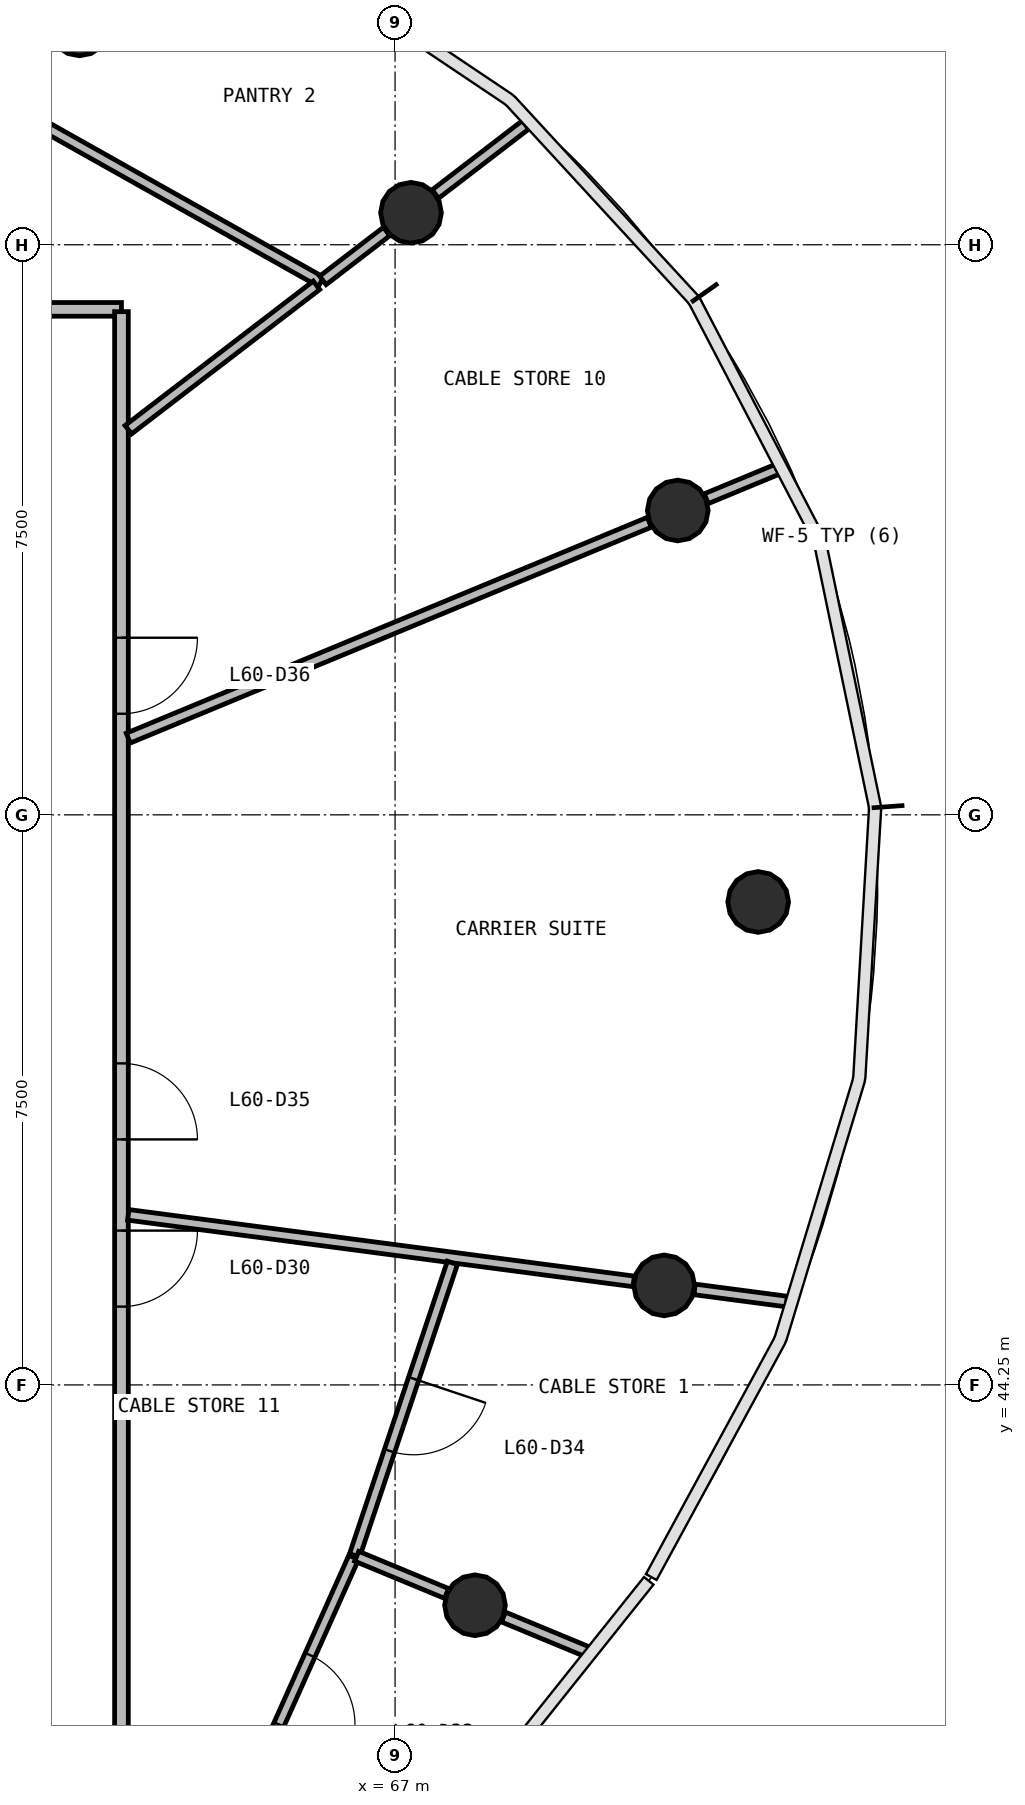
"""IFC4 building model, lengths in metres.
Left out: names, types, materials, properties, quantities, classifications, styles, units other than length and angle.
Written with IfcOpenShell. Run it as: python <this file> out.ifc"""

import sys

from ifc_helpers import new_model, si_unit, direction, frame, frame_2d, origin, origin_2d, place, context, subcontext, project, spatial, rectangle, circle, extrude, source, transform, mapped, element, fill, save


model = new_model("IFC4")
c1 = context("Model", 3, precision=1e-05, world=origin(), true_north=direction((0.0, 1.0)))
c2 = subcontext(c1, "Body", "Model", "MODEL_VIEW")
j1 = project(units=[si_unit("LENGTHUNIT", "METRE"), si_unit("PLANEANGLEUNIT", "RADIAN")], contexts=[c1])
p1 = place(None, origin())
s1 = spatial("IfcSite", under=j1, at=p1, CompositionType="ELEMENT")
p2 = place(p1, origin())
s2 = spatial("IfcBuilding", under=s1, at=p2, CompositionType="ELEMENT")
p3 = place(p2, frame((0.0, 0.0, 246.2)))
s3 = spatial("IfcBuildingStorey", under=s2, at=p3, CompositionType="ELEMENT", Elevation=246.2)
m1 = source(origin(), c2, "Body", "SweptSolid", [
    extrude(circle(Radius=0.4, at=origin_2d()), origin(), (0.0, 0.0, 1.0), 3.9),
])
for number, where, z_axis, x_axis in (
    (1, (71.777, 50.604, 0.0), (0.0, 0.0, 1.0), (1.0, 0.0, 0.0)),
    (2, (70.719, 55.754, 0.0), (0.0, 0.0, 1.0), (1.0, 0.0, 0.0)),
    (3, (67.209, 59.671, 0.0), (0.0, 0.0, 1.0), (1.0, 0.0, 0.0)),
    (4, (62.847, 62.136, 0.0), (0.0, 0.0, 1.0), (1.0, 0.0, 0.0)),
    (5, (68.052, 41.351, 0.0), (0.0, 0.0, 1.0), (1.0, 0.0, 0.0)),
    (6, (70.54, 45.559, 0.0), (0.0, 0.0, 1.0), (1.0, 0.0, 0.0)),
):
    element("IfcColumn", number, at=place(p3, frame(where, z_axis=z_axis, x_axis=x_axis)), inside=s3, PredefinedType="COLUMN", context=c2, shape_type="MappedRepresentation", body=[
        mapped(m1, transform((0.0, 0.0, 0.0), scale=1.0)),
    ])
p4 = place(p3, frame((40.6, 58.4, 0.0), z_axis=(0.0, 0.0, 1.0), x_axis=(1.0, 0.0, 0.0)))
e7 = element("IfcWall", 7, at=p4, inside=s3, PredefinedType="PARTITIONING", context=c2, shape_type="SweptSolid", body=[
    extrude(rectangle(XDim=22.8, YDim=0.18, at=frame_2d((11.4, 0.0))), origin(), (0.0, 0.0, 1.0), 2.88),
])
p5 = place(p4, frame((10.85, 0.0, 0.0)))
e8 = element("IfcOpeningElement", 8, at=p5, cuts=e7, PredefinedType="OPENING", context=c2, shape_type="SweptSolid", body=[
    extrude(rectangle(XDim=0.9, YDim=2.1, at=frame_2d((0.45, 1.05))), frame((0.0, 0.1, 0.0), z_axis=(0.0, -1.0, 0.0), x_axis=(1.0, 0.0, 0.0)), (0.0, 0.0, 1.0), 0.2),
])
p6 = place(p4, frame((8.85, 0.0, 0.0)))
e9 = element("IfcOpeningElement", 9, at=p6, cuts=e7, PredefinedType="OPENING", context=c2, shape_type="SweptSolid", body=[
    extrude(rectangle(XDim=0.9, YDim=2.1, at=frame_2d((0.45, 1.05))), frame((0.0, 0.1, 0.0), z_axis=(0.0, -1.0, 0.0), x_axis=(1.0, 0.0, 0.0)), (0.0, 0.0, 1.0), 0.2),
])
p7 = place(p4, frame((5.75, 0.0, 0.0)))
e10 = element("IfcOpeningElement", 10, at=p7, cuts=e7, PredefinedType="OPENING", context=c2, shape_type="SweptSolid", body=[
    extrude(rectangle(XDim=1.0, YDim=2.1, at=frame_2d((0.5, 1.05))), frame((0.0, 0.1, 0.0), z_axis=(0.0, -1.0, 0.0), x_axis=(1.0, 0.0, 0.0)), (0.0, 0.0, 1.0), 0.2),
])
p8 = place(p4, frame((16.15, 0.0, 0.0)))
e11 = element("IfcOpeningElement", 11, at=p8, cuts=e7, PredefinedType="OPENING", context=c2, shape_type="SweptSolid", body=[
    extrude(rectangle(XDim=1.0, YDim=2.1, at=frame_2d((0.5, 1.05))), frame((0.0, 0.1, 0.0), z_axis=(0.0, -1.0, 0.0), x_axis=(1.0, 0.0, 0.0)), (0.0, 0.0, 1.0), 0.2),
])
p9 = place(p4, frame((12.95, 0.0, 0.0)))
e12 = element("IfcOpeningElement", 12, at=p9, cuts=e7, PredefinedType="OPENING", context=c2, shape_type="SweptSolid", body=[
    extrude(rectangle(XDim=1.0, YDim=2.1, at=frame_2d((0.5, 1.05))), frame((0.0, 0.1, 0.0), z_axis=(0.0, -1.0, 0.0), x_axis=(1.0, 0.0, 0.0)), (0.0, 0.0, 1.0), 0.2),
])
p10 = place(p3, frame((63.4, 58.37, 0.0), z_axis=(0.0, 0.0, 1.0), x_axis=(0.0, -1.0, 0.0)))
e13 = element("IfcWall", 13, at=p10, inside=s3, PredefinedType="PARTITIONING", context=c2, shape_type="SweptSolid", body=[
    extrude(rectangle(XDim=20.74, YDim=0.18, at=frame_2d((10.37, 0.0))), origin(), (0.0, 0.0, 1.0), 2.88),
])
p11 = place(p10, frame((12.09, 0.0, 0.0)))
e14 = element("IfcOpeningElement", 14, at=p11, cuts=e13, PredefinedType="OPENING", context=c2, shape_type="SweptSolid", body=[
    extrude(rectangle(XDim=1.0, YDim=2.1, at=frame_2d((0.5, 1.05))), frame((0.0, 0.1, 0.0), z_axis=(0.0, -1.0, 0.0), x_axis=(1.0, 0.0, 0.0)), (0.0, 0.0, 1.0), 0.2),
])
p12 = place(p10, frame((9.89, 0.0, 0.0)))
e15 = element("IfcOpeningElement", 15, at=p12, cuts=e13, PredefinedType="OPENING", context=c2, shape_type="SweptSolid", body=[
    extrude(rectangle(XDim=1.0, YDim=2.1, at=frame_2d((0.5, 1.05))), frame((0.0, 0.1, 0.0), z_axis=(0.0, -1.0, 0.0), x_axis=(1.0, 0.0, 0.0)), (0.0, 0.0, 1.0), 0.2),
])
p13 = place(p10, frame((4.29, 0.0, 0.0)))
e16 = element("IfcOpeningElement", 16, at=p13, cuts=e13, PredefinedType="OPENING", context=c2, shape_type="SweptSolid", body=[
    extrude(rectangle(XDim=1.0, YDim=2.1, at=frame_2d((0.5, 1.05))), frame((0.0, 0.1, 0.0), z_axis=(0.0, -1.0, 0.0), x_axis=(1.0, 0.0, 0.0)), (0.0, 0.0, 1.0), 0.2),
])
p14 = place(p3, frame((63.49, 52.759, 0.0), z_axis=(0.0, 0.0, 1.0), x_axis=(0.92388089155, 0.38268015134, 0.0)))
e17 = element("IfcWall", 17, at=p14, inside=s3, PredefinedType="PARTITIONING", context=c2, shape_type="SweptSolid", body=[
    extrude(rectangle(XDim=7.42, YDim=0.14, at=frame_2d((3.71, 0.0))), origin(), (0.0, 0.0, 1.0), 2.88),
])
p15 = place(p3, frame((70.139, 45.612, 0.0), z_axis=(0.0, 0.0, 1.0), x_axis=(-0.991446859335, 0.130511015301, 0.0)))
e18 = element("IfcWall", 18, at=p15, inside=s3, PredefinedType="PARTITIONING", context=c2, shape_type="SweptSolid", body=[
    extrude(rectangle(XDim=6.706, YDim=0.14, at=frame_2d((3.353, 0.0))), origin(), (0.0, 0.0, 1.0), 2.88),
])
p16 = place(p3, frame((66.026, 58.763, 0.0), z_axis=(0.0, 0.0, 1.0), x_axis=(-0.871725001743, 0.489995429914, 0.0)))
e19 = element("IfcWall", 19, at=p16, inside=s3, PredefinedType="PARTITIONING", context=c2, shape_type="SweptSolid", body=[
    extrude(rectangle(XDim=4.623, YDim=0.14, at=frame_2d((2.312, 0.0))), origin(), (0.0, 0.0, 1.0), 2.88),
])
p17 = place(p3, frame((67.754, 45.855, 0.0), z_axis=(0.0, 0.0, 1.0), x_axis=(-0.317003922607, -0.94842422631, 0.0)))
e20 = element("IfcWall", 20, at=p17, inside=s3, PredefinedType="PARTITIONING", context=c2, shape_type="SweptSolid", body=[
    extrude(rectangle(XDim=4.057, YDim=0.14, at=frame_2d((2.029, 0.0))), origin(), (0.0, 0.0, 1.0), 2.88),
])
p18 = place(p17, frame((1.607, 0.0, 0.0)))
e21 = element("IfcOpeningElement", 21, at=p18, cuts=e20, PredefinedType="OPENING", context=c2, shape_type="SweptSolid", body=[
    extrude(rectangle(XDim=1.0, YDim=2.1, at=frame_2d((0.5, 1.05))), frame((0.0, 0.08, 0.0), z_axis=(0.0, -1.0, 0.0), x_axis=(1.0, 0.0, 0.0)), (0.0, 0.0, 1.0), 0.16),
])
p19 = place(p3, frame((66.455, 41.98, 0.0), z_axis=(0.0, 0.0, 1.0), x_axis=(-0.40831609547, -0.912840602833, 0.0)))
e22 = element("IfcWall", 22, at=p19, inside=s3, PredefinedType="PARTITIONING", context=c2, shape_type="SweptSolid", body=[
    extrude(rectangle(XDim=3.857, YDim=0.14, at=frame_2d((1.929, 0.0))), origin(), (0.0, 0.0, 1.0), 2.88),
])
p20 = place(p19, frame((1.407, 0.0, 0.0)))
e23 = element("IfcOpeningElement", 23, at=p20, cuts=e22, PredefinedType="OPENING", context=c2, shape_type="SweptSolid", body=[
    extrude(rectangle(XDim=1.0, YDim=2.1, at=frame_2d((0.5, 1.05))), frame((0.0, 0.08, 0.0), z_axis=(0.0, -1.0, 0.0), x_axis=(1.0, 0.0, 0.0)), (0.0, 0.0, 1.0), 0.16),
])
p21 = place(p3, frame((63.49, 56.817, 0.0), z_axis=(0.0, 0.0, 1.0), x_axis=(0.793370833445, 0.608738630809, 0.0)))
e24 = element("IfcWall", 24, at=p21, inside=s3, PredefinedType="PARTITIONING", context=c2, shape_type="SweptSolid", body=[
    extrude(rectangle(XDim=3.121, YDim=0.14, at=frame_2d((1.56, 0.0))), origin(), (0.0, 0.0, 1.0), 2.88),
])
p22 = place(p3, frame((67.531, 59.917, 0.0), z_axis=(0.0, 0.0, 1.0), x_axis=(0.793327668176, 0.6087948841, 0.0)))
e25 = element("IfcWall", 25, at=p22, inside=s3, PredefinedType="PARTITIONING", context=c2, shape_type="SweptSolid", body=[
    extrude(rectangle(XDim=1.495, YDim=0.14, at=frame_2d((0.748, 0.0))), origin(), (0.0, 0.0, 1.0), 2.88),
])
p23 = place(p3, frame((66.495, 41.996, 0.0), z_axis=(0.0, 0.0, 1.0), x_axis=(0.923826077578, -0.382812458505, 0.0)))
e26 = element("IfcWall", 26, at=p23, inside=s3, PredefinedType="PARTITIONING", context=c2, shape_type="SweptSolid", body=[
    extrude(rectangle(XDim=1.279, YDim=0.14, at=frame_2d((0.64, 0.0))), origin(), (0.0, 0.0, 1.0), 2.88),
])
p24 = place(p3, frame((70.941, 45.506, 0.0), z_axis=(0.0, 0.0, 1.0), x_axis=(0.991435934833, -0.130593978123, 0.0)))
e27 = element("IfcWall", 27, at=p24, inside=s3, PredefinedType="PARTITIONING", context=c2, shape_type="SweptSolid", body=[
    extrude(rectangle(XDim=1.223, YDim=0.14, at=frame_2d((0.611, 0.0))), origin(), (0.0, 0.0, 1.0), 2.88),
])
p25 = place(p3, frame((68.426, 41.196, 0.0), z_axis=(0.0, 0.0, 1.0), x_axis=(0.923850829611, -0.382752719947, 0.0)))
e28 = element("IfcWall", 28, at=p25, inside=s3, PredefinedType="PARTITIONING", context=c2, shape_type="SweptSolid", body=[
    extrude(rectangle(XDim=1.201, YDim=0.14, at=frame_2d((0.601, 0.0))), origin(), (0.0, 0.0, 1.0), 2.88),
])
p26 = place(p3, frame((66.05, 58.781, 0.0), z_axis=(0.0, 0.0, 1.0), x_axis=(0.793353438114, 0.608761301523, 0.0)))
e29 = element("IfcWall", 29, at=p26, inside=s3, PredefinedType="PARTITIONING", context=c2, shape_type="SweptSolid", body=[
    extrude(rectangle(XDim=1.057, YDim=0.14, at=frame_2d((0.528, 0.0))), origin(), (0.0, 0.0, 1.0), 2.88),
])
p27 = place(p3, frame((71.094, 55.909, 0.0), z_axis=(0.0, 0.0, 1.0), x_axis=(0.92391047829, 0.382608714102, 0.0)))
e30 = element("IfcWall", 30, at=p27, inside=s3, PredefinedType="PARTITIONING", context=c2, shape_type="SweptSolid", body=[
    extrude(rectangle(XDim=1.063, YDim=0.14, at=frame_2d((0.531, 0.0))), origin(), (0.0, 0.0, 1.0), 2.88),
])
m2 = source(origin(), c2, "Body", "SweptSolid", [
    extrude(rectangle(XDim=1.0, YDim=2.1, at=frame_2d((0.5, 1.05))), frame((0.0, 0.025, 0.0), z_axis=(0.0, -1.0, 0.0), x_axis=(1.0, 0.0, 0.0)), (0.0, 0.0, 1.0), 0.05),
])
p28 = place(p11, origin())
e31 = element("IfcDoor", 31, at=p28, inside=s3, OperationType="SINGLE_SWING_LEFT", PredefinedType="DOOR", context=c2, shape_type="MappedRepresentation", body=[
    mapped(m2, transform((0.0, 0.0, 0.0), scale=1.0)),
])
fill(e14, e31)
p29 = place(p20, origin())
e32 = element("IfcDoor", 32, at=p29, inside=s3, OperationType="SINGLE_SWING_RIGHT", PredefinedType="DOOR", context=c2, shape_type="MappedRepresentation", body=[
    mapped(m2, transform((0.0, 0.0, 0.0), scale=1.0)),
])
fill(e23, e32)
p30 = place(p18, origin())
e33 = element("IfcDoor", 33, at=p30, inside=s3, OperationType="SINGLE_SWING_LEFT", PredefinedType="DOOR", context=c2, shape_type="MappedRepresentation", body=[
    mapped(m2, transform((0.0, 0.0, 0.0), scale=1.0)),
])
fill(e21, e33)
p31 = place(p12, origin())
e34 = element("IfcDoor", 34, at=p31, inside=s3, OperationType="SINGLE_SWING_RIGHT", PredefinedType="DOOR", context=c2, shape_type="MappedRepresentation", body=[
    mapped(m2, transform((0.0, 0.0, 0.0), scale=1.0)),
])
fill(e15, e34)
p32 = place(p13, origin())
e35 = element("IfcDoor", 35, at=p32, inside=s3, OperationType="SINGLE_SWING_LEFT", PredefinedType="DOOR", context=c2, shape_type="MappedRepresentation", body=[
    mapped(m2, transform((0.0, 0.0, 0.0), scale=1.0)),
])
fill(e16, e35)
save(model, sys.argv[1])
